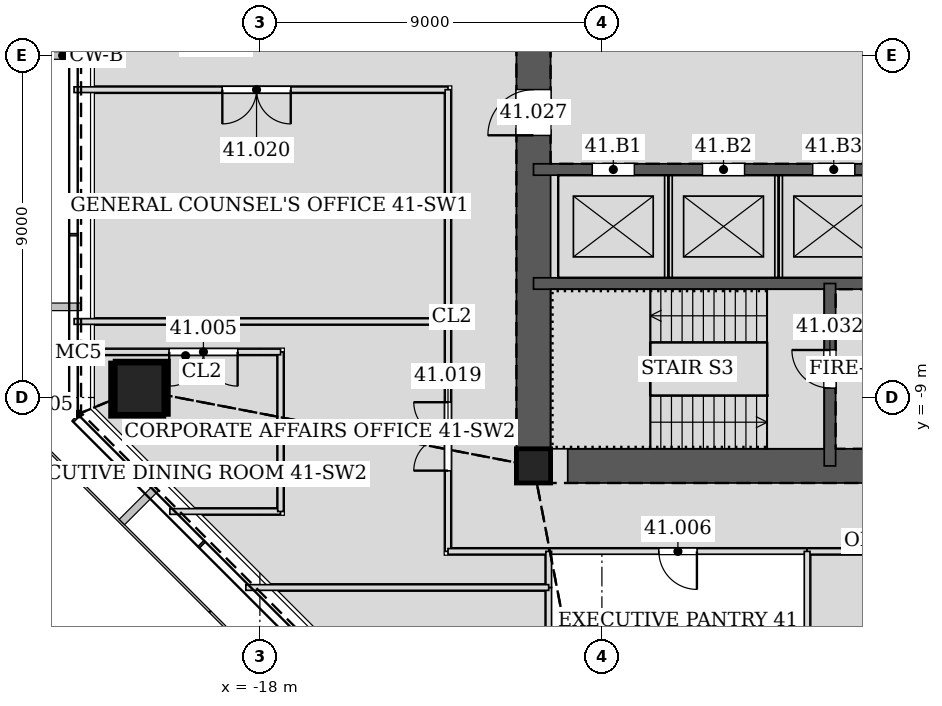
"""IFC4 building model, lengths in metres.
Left out: names, types, materials, properties, quantities, classifications, styles, units other than length and angle.
Written with IfcOpenShell. Run it as: python <this file> out.ifc"""

import sys

from ifc_helpers import new_model, si_unit, direction, frame, frame_2d, origin, origin_2d, place, context, subcontext, project, spatial, rectangle, hollow_rectangle, extrude, element, fill, save


model = new_model("IFC4")
c1 = context("Model", 3, precision=1e-05, world=origin(), true_north=direction((0.0, 1.0)))
c2 = subcontext(c1, "Body", "Model", "MODEL_VIEW")
j1 = project(units=[si_unit("LENGTHUNIT", "METRE"), si_unit("PLANEANGLEUNIT", "RADIAN")], contexts=[c1])
p1 = place(None, origin())
s1 = spatial("IfcSite", under=j1, at=p1, CompositionType="ELEMENT")
p2 = place(p1, origin())
s2 = spatial("IfcBuilding", under=s1, at=p2, CompositionType="ELEMENT")
p3 = place(p2, frame((0.0, 0.0, 180.6)))
s3 = spatial("IfcBuildingStorey", under=s2, at=p3, CompositionType="ELEMENT", Elevation=180.6)
p4 = place(p3, frame((-21.228, -8.793, 0.0), z_axis=(0.028237693676, 0.011678552323, 0.999533012997), x_axis=(-0.382183844423, 0.924086310396, 0.0)))
e1 = element("IfcColumn", 1, at=p4, inside=s3, PredefinedType="COLUMN", context=c2, shape_type="SweptSolid", body=[
    extrude(hollow_rectangle(XDim=1.4, YDim=1.4, WallThickness=0.065, at=origin_2d()), origin(), (0.0, 0.0, 1.0), 4.202),
])
p5 = place(p3, frame((-22.106, 0.0, 0.0), z_axis=(0.028239619523, 0.0, 0.999601182417), x_axis=(0.0, 1.0, 0.0)))
e2 = element("IfcColumn", 2, at=p5, inside=s3, PredefinedType="COLUMN", context=c2, shape_type="SweptSolid", body=[
    extrude(hollow_rectangle(XDim=0.5, YDim=0.5, WallThickness=0.025, at=origin_2d()), origin(), (0.0, 0.0, 1.0), 4.202),
])
p6 = place(p3, frame((-10.8, -10.8, 0.0), z_axis=(0.0, 0.0, 1.0), x_axis=(1.0, 0.0, 0.0)))
e3 = element("IfcColumn", 3, at=p6, inside=s3, PredefinedType="COLUMN", context=c2, shape_type="SweptSolid", body=[
    extrude(hollow_rectangle(XDim=0.9, YDim=0.9, WallThickness=0.06, at=origin_2d()), origin(), (0.0, 0.0, 1.0), 4.2),
])
p7 = place(p3, frame((-10.8, -10.8, 0.0), z_axis=(0.0, 0.0, 1.0), x_axis=(1.0, 0.0, 0.0)))
e4 = element("IfcWall", 4, at=p7, inside=s3, PredefinedType="SOLIDWALL", context=c2, shape_type="SweptSolid", body=[
    extrude(rectangle(XDim=21.6, YDim=0.9, at=frame_2d((10.8, 0.0))), origin(), (0.0, 0.0, 1.0), 4.2),
])
p8 = place(p7, frame((10.05, 0.0, 0.0)))
e5 = element("IfcOpeningElement", 5, at=p8, cuts=e4, PredefinedType="OPENING", context=c2, shape_type="SweptSolid", body=[
    extrude(rectangle(XDim=1.5, YDim=2.1, at=frame_2d((0.75, 1.05))), frame((0.0, 0.46, 0.0), z_axis=(0.0, -1.0, 0.0), x_axis=(1.0, 0.0, 0.0)), (0.0, 0.0, 1.0), 0.92),
])
p9 = place(p7, frame((17.1, 0.0, 0.0)))
e6 = element("IfcOpeningElement", 6, at=p9, cuts=e4, PredefinedType="OPENING", context=c2, shape_type="SweptSolid", body=[
    extrude(rectangle(XDim=0.9, YDim=2.1, at=frame_2d((0.45, 1.05))), frame((0.0, 0.46, 0.0), z_axis=(0.0, -1.0, 0.0), x_axis=(1.0, 0.0, 0.0)), (0.0, 0.0, 1.0), 0.92),
])
p10 = place(p3, frame((-10.8, 10.8, 0.0), z_axis=(0.0, 0.0, 1.0), x_axis=(0.0, -1.0, 0.0)))
e7 = element("IfcWall", 7, at=p10, inside=s3, PredefinedType="SOLIDWALL", context=c2, shape_type="SweptSolid", body=[
    extrude(rectangle(XDim=21.6, YDim=0.9, at=frame_2d((10.8, 0.0))), origin(), (0.0, 0.0, 1.0), 4.2),
])
p11 = place(p10, frame((8.7, 0.0, 0.0)))
e8 = element("IfcOpeningElement", 8, at=p11, cuts=e7, PredefinedType="OPENING", context=c2, shape_type="SweptSolid", body=[
    extrude(rectangle(XDim=1.2, YDim=2.1, at=frame_2d((0.6, 1.05))), frame((0.0, 0.46, 0.0), z_axis=(0.0, -1.0, 0.0), x_axis=(1.0, 0.0, 0.0)), (0.0, 0.0, 1.0), 0.92),
])
p12 = place(p10, frame((11.7, 0.0, 0.0)))
e9 = element("IfcOpeningElement", 9, at=p12, cuts=e7, PredefinedType="OPENING", context=c2, shape_type="SweptSolid", body=[
    extrude(rectangle(XDim=1.2, YDim=2.1, at=frame_2d((0.6, 1.05))), frame((0.0, 0.46, 0.0), z_axis=(0.0, -1.0, 0.0), x_axis=(1.0, 0.0, 0.0)), (0.0, 0.0, 1.0), 0.92),
])
p13 = place(p3, frame((-10.8, -3.0, 0.0), z_axis=(0.0, 0.0, 1.0), x_axis=(1.0, 0.0, 0.0)))
e10 = element("IfcWall", 10, at=p13, inside=s3, PredefinedType="SOLIDWALL", context=c2, shape_type="SweptSolid", body=[
    extrude(rectangle(XDim=21.6, YDim=0.3, at=frame_2d((10.8, 0.0))), origin(), (0.0, 0.0, 1.0), 4.2),
])
p14 = place(p13, frame((1.55, 0.0, 0.0)))
e11 = element("IfcOpeningElement", 11, at=p14, cuts=e10, PredefinedType="OPENING", context=c2, shape_type="SweptSolid", body=[
    extrude(rectangle(XDim=1.1, YDim=2.1, at=frame_2d((0.55, 1.05))), frame((0.0, 0.16, 0.0), z_axis=(0.0, -1.0, 0.0), x_axis=(1.0, 0.0, 0.0)), (0.0, 0.0, 1.0), 0.32),
])
p15 = place(p13, frame((4.45, 0.0, 0.0)))
e12 = element("IfcOpeningElement", 12, at=p15, cuts=e10, PredefinedType="OPENING", context=c2, shape_type="SweptSolid", body=[
    extrude(rectangle(XDim=1.1, YDim=2.1, at=frame_2d((0.55, 1.05))), frame((0.0, 0.16, 0.0), z_axis=(0.0, -1.0, 0.0), x_axis=(1.0, 0.0, 0.0)), (0.0, 0.0, 1.0), 0.32),
])
p16 = place(p13, frame((7.35, 0.0, 0.0)))
e13 = element("IfcOpeningElement", 13, at=p16, cuts=e10, PredefinedType="OPENING", context=c2, shape_type="SweptSolid", body=[
    extrude(rectangle(XDim=1.1, YDim=2.1, at=frame_2d((0.55, 1.05))), frame((0.0, 0.16, 0.0), z_axis=(0.0, -1.0, 0.0), x_axis=(1.0, 0.0, 0.0)), (0.0, 0.0, 1.0), 0.32),
])
p17 = place(p13, frame((13.15, 0.0, 0.0)))
e14 = element("IfcOpeningElement", 14, at=p17, cuts=e10, PredefinedType="OPENING", context=c2, shape_type="SweptSolid", body=[
    extrude(rectangle(XDim=1.1, YDim=2.1, at=frame_2d((0.55, 1.05))), frame((0.0, 0.16, 0.0), z_axis=(0.0, -1.0, 0.0), x_axis=(1.0, 0.0, 0.0)), (0.0, 0.0, 1.0), 0.32),
])
p18 = place(p3, frame((-10.8, -6.0, 0.0), z_axis=(0.0, 0.0, 1.0), x_axis=(1.0, 0.0, 0.0)))
e15 = element("IfcWall", 15, at=p18, inside=s3, PredefinedType="SOLIDWALL", context=c2, shape_type="SweptSolid", body=[
    extrude(rectangle(XDim=21.6, YDim=0.3, at=frame_2d((10.8, 0.0))), origin(), (0.0, 0.0, 1.0), 4.2),
])
p19 = place(p18, frame((10.25, 0.0, 0.0)))
e16 = element("IfcOpeningElement", 16, at=p19, cuts=e15, PredefinedType="OPENING", context=c2, shape_type="SweptSolid", body=[
    extrude(rectangle(XDim=1.1, YDim=2.1, at=frame_2d((0.55, 1.05))), frame((0.0, 0.16, 0.0), z_axis=(0.0, -1.0, 0.0), x_axis=(1.0, 0.0, 0.0)), (0.0, 0.0, 1.0), 0.32),
])
p20 = place(p3, frame((-3.0, -6.0, 0.0), z_axis=(0.0, 0.0, 1.0), x_axis=(0.0, -1.0, 0.0)))
e17 = element("IfcWall", 17, at=p20, inside=s3, PredefinedType="SOLIDWALL", context=c2, shape_type="SweptSolid", body=[
    extrude(rectangle(XDim=4.8, YDim=0.3, at=frame_2d((2.4, 0.0))), origin(), (0.0, 0.0, 1.0), 4.2),
])
p21 = place(p20, frame((1.75, 0.0, 0.0)))
e18 = element("IfcOpeningElement", 18, at=p21, cuts=e17, PredefinedType="OPENING", context=c2, shape_type="SweptSolid", body=[
    extrude(rectangle(XDim=1.0, YDim=2.1, at=frame_2d((0.5, 1.05))), frame((0.0, 0.16, 0.0), z_axis=(0.0, -1.0, 0.0), x_axis=(1.0, 0.0, 0.0)), (0.0, 0.0, 1.0), 0.32),
])
p22 = place(p3, frame((-10.401, -13.05, 0.0), z_axis=(0.0, 0.0, 1.0), x_axis=(1.0, 0.0, 0.0)))
e19 = element("IfcWall", 19, at=p22, inside=s3, PredefinedType="PARTITIONING", context=c2, shape_type="SweptSolid", body=[
    extrude(rectangle(XDim=6.802, YDim=0.15, at=frame_2d((3.401, 0.0))), origin(), (0.0, 0.0, 1.0), 3.167),
])
p23 = place(p22, frame((2.901, 0.0, 0.0)))
e20 = element("IfcOpeningElement", 20, at=p23, cuts=e19, PredefinedType="OPENING", context=c2, shape_type="SweptSolid", body=[
    extrude(rectangle(XDim=1.0, YDim=2.1, at=frame_2d((0.5, 1.05))), frame((0.0, 0.085, 0.0), z_axis=(0.0, -1.0, 0.0), x_axis=(1.0, 0.0, 0.0)), (0.0, 0.0, 1.0), 0.17),
])
p24 = place(p3, frame((-3.601, -13.05, 0.0), z_axis=(0.0, 0.0, 1.0), x_axis=(1.0, 0.0, 0.0)))
e21 = element("IfcWall", 21, at=p24, inside=s3, PredefinedType="PARTITIONING", context=c2, shape_type="SweptSolid", body=[
    extrude(rectangle(XDim=2.701, YDim=0.15, at=frame_2d((1.351, 0.0))), origin(), (0.0, 0.0, 1.0), 4.035),
])
p25 = place(p3, frame((-13.05, -6.999, 0.0), z_axis=(0.0, 0.0, 1.0), x_axis=(0.0, -1.0, 0.0)))
e22 = element("IfcWall", 22, at=p25, inside=s3, PredefinedType="PARTITIONING", context=c2, shape_type="SweptSolid", body=[
    extrude(rectangle(XDim=6.051, YDim=0.15, at=frame_2d((3.025, 0.0))), origin(), (0.0, 0.0, 1.0), 3.167),
])
p26 = place(p25, frame((2.125, 0.0, 0.0)))
e23 = element("IfcOpeningElement", 23, at=p26, cuts=e22, PredefinedType="OPENING", context=c2, shape_type="SweptSolid", body=[
    extrude(rectangle(XDim=1.8, YDim=2.4, at=frame_2d((0.9, 1.2))), frame((0.0, 0.085, 0.0), z_axis=(0.0, -1.0, 0.0), x_axis=(1.0, 0.0, 0.0)), (0.0, 0.0, 1.0), 0.17),
])
p27 = place(p3, frame((-13.05, -13.05, 0.0), z_axis=(0.0, 0.0, 1.0), x_axis=(1.0, 0.0, 0.0)))
e24 = element("IfcWall", 24, at=p27, inside=s3, PredefinedType="PARTITIONING", context=c2, shape_type="SweptSolid", body=[
    extrude(rectangle(XDim=2.651, YDim=0.15, at=frame_2d((1.326, 0.0))), origin(), (0.0, 0.0, 1.0), 3.167),
])
p28 = place(p3, frame((-22.89, -0.9, 0.0), z_axis=(0.0, 0.0, 1.0), x_axis=(1.0, 0.0, 0.0)))
e25 = element("IfcWall", 25, at=p28, inside=s3, PredefinedType="PARTITIONING", context=c2, shape_type="SweptSolid", body=[
    extrude(rectangle(XDim=9.84, YDim=0.15, at=frame_2d((4.92, 0.0))), origin(), (0.0, 0.0, 1.0), 3.426),
])
p29 = place(p28, frame((3.902, 0.0, 0.0)))
e26 = element("IfcOpeningElement", 26, at=p29, cuts=e25, PredefinedType="OPENING", context=c2, shape_type="SweptSolid", body=[
    extrude(rectangle(XDim=1.8, YDim=2.4, at=frame_2d((0.9, 1.2))), frame((0.0, 0.085, 0.0), z_axis=(0.0, -1.0, 0.0), x_axis=(1.0, 0.0, 0.0)), (0.0, 0.0, 1.0), 0.17),
])
p30 = place(p3, frame((-13.05, -0.9, 0.0), z_axis=(0.0, 0.0, 1.0), x_axis=(0.0, -1.0, 0.0)))
e27 = element("IfcWall", 27, at=p30, inside=s3, PredefinedType="PARTITIONING", context=c2, shape_type="SweptSolid", body=[
    extrude(rectangle(XDim=6.101, YDim=0.15, at=frame_2d((3.051, 0.0))), origin(), (0.0, 0.0, 1.0), 4.035),
])
p31 = place(p3, frame((-20.37, -12.0, 0.0), z_axis=(0.0, 0.0, 1.0), x_axis=(1.0, 0.0, 0.0)))
e28 = element("IfcWall", 28, at=p31, inside=s3, PredefinedType="PARTITIONING", context=c2, shape_type="SweptSolid", body=[
    extrude(rectangle(XDim=2.914, YDim=0.15, at=frame_2d((1.457, 0.0))), origin(), (0.0, 0.0, 1.0), 3.499),
])
p32 = place(p3, frame((-17.456, -12.0, 0.0), z_axis=(0.0, 0.0, 1.0), x_axis=(0.0, 1.0, 0.0)))
e29 = element("IfcWall", 29, at=p32, inside=s3, PredefinedType="PARTITIONING", context=c2, shape_type="SweptSolid", body=[
    extrude(rectangle(XDim=4.2, YDim=0.15, at=frame_2d((2.1, 0.0))), origin(), (0.0, 0.0, 1.0), 3.167),
])
p33 = place(p3, frame((-17.456, -7.8, 0.0), z_axis=(0.0, 0.0, 1.0), x_axis=(-1.0, 0.0, 0.0)))
e30 = element("IfcWall", 30, at=p33, inside=s3, PredefinedType="PARTITIONING", context=c2, shape_type="SweptSolid", body=[
    extrude(rectangle(XDim=5.434, YDim=0.15, at=frame_2d((2.717, 0.0))), origin(), (0.0, 0.0, 1.0), 3.426),
])
p34 = place(p33, frame((1.13, 0.0, 0.0)))
e31 = element("IfcOpeningElement", 31, at=p34, cuts=e30, PredefinedType="OPENING", context=c2, shape_type="SweptSolid", body=[
    extrude(rectangle(XDim=1.8, YDim=2.4, at=frame_2d((0.9, 1.2))), frame((0.0, 0.085, 0.0), z_axis=(0.0, -1.0, 0.0), x_axis=(1.0, 0.0, 0.0)), (0.0, 0.0, 1.0), 0.17),
])
p35 = place(p3, frame((-10.4, -13.999, 0.0), z_axis=(0.0, 0.0, 1.0), x_axis=(0.0, -1.0, 0.0)))
e32 = element("IfcWall", 32, at=p35, inside=s3, PredefinedType="PARTITIONING", context=c2, shape_type="SweptSolid", body=[
    extrude(rectangle(XDim=1.501, YDim=0.15, at=frame_2d((0.75, 0.0))), origin(), (0.0, 0.0, 1.0), 3.715),
])
p36 = place(p3, frame((-3.6, -15.5, 0.0), z_axis=(0.0, 0.0, 1.0), x_axis=(0.0, 1.0, 0.0)))
e33 = element("IfcWall", 33, at=p36, inside=s3, PredefinedType="PARTITIONING", context=c2, shape_type="SweptSolid", body=[
    extrude(rectangle(XDim=2.45, YDim=0.15, at=frame_2d((1.225, 0.0))), origin(), (0.0, 0.0, 1.0), 3.426),
])
p37 = place(p3, frame((-10.4, -13.05, 0.0), z_axis=(0.0, 0.0, 1.0), x_axis=(0.0, -1.0, 0.0)))
e34 = element("IfcWall", 34, at=p37, inside=s3, PredefinedType="PARTITIONING", context=c2, shape_type="SweptSolid", body=[
    extrude(rectangle(XDim=0.951, YDim=0.15, at=frame_2d((0.476, 0.0))), origin(), (0.0, 0.0, 1.0), 3.167),
])
p38 = place(p3, frame((-10.4, -14.0, 0.0), z_axis=(0.0, 0.0, 1.0), x_axis=(-1.0, 0.0, 0.0)))
e35 = element("IfcWall", 35, at=p38, inside=s3, PredefinedType="PARTITIONING", context=c2, shape_type="SweptSolid", body=[
    extrude(rectangle(XDim=7.97, YDim=0.15, at=frame_2d((3.985, 0.0))), origin(), (0.0, 0.0, 1.0), 3.342),
])
p39 = place(p3, frame((-13.05, -7.0, 0.0), z_axis=(0.0, 0.0, 1.0), x_axis=(-1.0, 0.0, 0.0)))
e36 = element("IfcWall", 36, at=p39, inside=s3, PredefinedType="PARTITIONING", context=c2, shape_type="SweptSolid", body=[
    extrude(rectangle(XDim=9.838, YDim=0.15, at=frame_2d((4.919, 0.0))), origin(), (0.0, 0.0, 1.0), 3.426),
])
for number, where, z_axis, x_axis in (
    (37, (-7.25, -5.85, 0.0), (0.0, 0.0, 1.0), (0.0, 1.0, 0.0)),
    (38, (-4.35, -5.85, 0.0), (0.0, 0.0, 1.0), (0.0, 1.0, 0.0)),
):
    element("IfcWall", number, at=place(p3, frame(where, z_axis=z_axis, x_axis=x_axis)), inside=s3, PredefinedType="PARTITIONING", context=c2, shape_type="SweptSolid", body=[
        extrude(rectangle(XDim=2.7, YDim=0.2, at=frame_2d((1.35, 0.0))), origin(), (0.0, 0.0, 1.0), 4.2),
    ])
p40 = place(p34, origin())
e39 = element("IfcDoor", 39, at=p40, inside=s3, OperationType="DOUBLE_DOOR_SINGLE_SWING", PredefinedType="DOOR", context=c2, shape_type="SweptSolid", body=[
    extrude(rectangle(XDim=1.8, YDim=2.4, at=frame_2d((0.9, 1.2))), frame((0.0, 0.025, 0.0), z_axis=(0.0, -1.0, 0.0), x_axis=(1.0, 0.0, 0.0)), (0.0, 0.0, 1.0), 0.05),
])
fill(e31, e39)
p41 = place(p23, frame((1.0, 0.0, 0.0), z_axis=(0.0, 0.0, 1.0), x_axis=(-1.0, 0.0, 0.0)))
e40 = element("IfcDoor", 40, at=p41, inside=s3, OperationType="SINGLE_SWING_LEFT", PredefinedType="DOOR", context=c2, shape_type="SweptSolid", body=[
    extrude(rectangle(XDim=1.0, YDim=2.1, at=frame_2d((0.5, 1.05))), frame((0.0, 0.025, 0.0), z_axis=(0.0, -1.0, 0.0), x_axis=(1.0, 0.0, 0.0)), (0.0, 0.0, 1.0), 0.05),
])
fill(e20, e40)
p42 = place(p26, frame((1.8, 0.0, 0.0), z_axis=(0.0, 0.0, 1.0), x_axis=(-1.0, 0.0, 0.0)))
e41 = element("IfcDoor", 41, at=p42, inside=s3, OperationType="DOUBLE_DOOR_SINGLE_SWING", PredefinedType="DOOR", context=c2, shape_type="SweptSolid", body=[
    extrude(rectangle(XDim=1.8, YDim=2.4, at=frame_2d((0.9, 1.2))), frame((0.0, 0.025, 0.0), z_axis=(0.0, -1.0, 0.0), x_axis=(1.0, 0.0, 0.0)), (0.0, 0.0, 1.0), 0.05),
])
fill(e23, e41)
p43 = place(p29, frame((1.8, 0.0, 0.0), z_axis=(0.0, 0.0, 1.0), x_axis=(-1.0, 0.0, 0.0)))
e42 = element("IfcDoor", 42, at=p43, inside=s3, OperationType="DOUBLE_DOOR_SINGLE_SWING", PredefinedType="DOOR", context=c2, shape_type="SweptSolid", body=[
    extrude(rectangle(XDim=1.8, YDim=2.4, at=frame_2d((0.9, 1.2))), frame((0.0, 0.025, 0.0), z_axis=(0.0, -1.0, 0.0), x_axis=(1.0, 0.0, 0.0)), (0.0, 0.0, 1.0), 0.05),
])
fill(e26, e42)
p44 = place(p12, frame((1.2, 0.0, 0.0), z_axis=(0.0, 0.0, 1.0), x_axis=(-1.0, 0.0, 0.0)))
e43 = element("IfcDoor", 43, at=p44, inside=s3, OperationType="SINGLE_SWING_LEFT", PredefinedType="DOOR", context=c2, shape_type="SweptSolid", body=[
    extrude(rectangle(XDim=1.2, YDim=2.1, at=frame_2d((0.6, 1.05))), frame((0.0, 0.025, 0.0), z_axis=(0.0, -1.0, 0.0), x_axis=(1.0, 0.0, 0.0)), (0.0, 0.0, 1.0), 0.05),
])
fill(e9, e43)
p45 = place(p21, frame((1.0, 0.0, 0.0), z_axis=(0.0, 0.0, 1.0), x_axis=(-1.0, 0.0, 0.0)))
e44 = element("IfcDoor", 44, at=p45, inside=s3, OperationType="SINGLE_SWING_RIGHT", PredefinedType="DOOR", context=c2, shape_type="SweptSolid", body=[
    extrude(rectangle(XDim=1.0, YDim=2.1, at=frame_2d((0.5, 1.05))), frame((0.0, 0.025, 0.0), z_axis=(0.0, -1.0, 0.0), x_axis=(1.0, 0.0, 0.0)), (0.0, 0.0, 1.0), 0.05),
])
fill(e18, e44)
p46 = place(p14, origin())
e45 = element("IfcDoor", 45, at=p46, inside=s3, OperationType="DOUBLE_DOOR_SLIDING", PredefinedType="DOOR", context=c2, shape_type="SweptSolid", body=[
    extrude(rectangle(XDim=1.1, YDim=2.1, at=frame_2d((0.55, 1.05))), frame((0.0, 0.025, 0.0), z_axis=(0.0, -1.0, 0.0), x_axis=(1.0, 0.0, 0.0)), (0.0, 0.0, 1.0), 0.05),
])
fill(e11, e45)
p47 = place(p15, origin())
e46 = element("IfcDoor", 46, at=p47, inside=s3, OperationType="DOUBLE_DOOR_SLIDING", PredefinedType="DOOR", context=c2, shape_type="SweptSolid", body=[
    extrude(rectangle(XDim=1.1, YDim=2.1, at=frame_2d((0.55, 1.05))), frame((0.0, 0.025, 0.0), z_axis=(0.0, -1.0, 0.0), x_axis=(1.0, 0.0, 0.0)), (0.0, 0.0, 1.0), 0.05),
])
fill(e12, e46)
p48 = place(p16, origin())
e47 = element("IfcDoor", 47, at=p48, inside=s3, OperationType="DOUBLE_DOOR_SLIDING", PredefinedType="DOOR", context=c2, shape_type="SweptSolid", body=[
    extrude(rectangle(XDim=1.1, YDim=2.1, at=frame_2d((0.55, 1.05))), frame((0.0, 0.025, 0.0), z_axis=(0.0, -1.0, 0.0), x_axis=(1.0, 0.0, 0.0)), (0.0, 0.0, 1.0), 0.05),
])
fill(e13, e47)
save(model, sys.argv[1])
